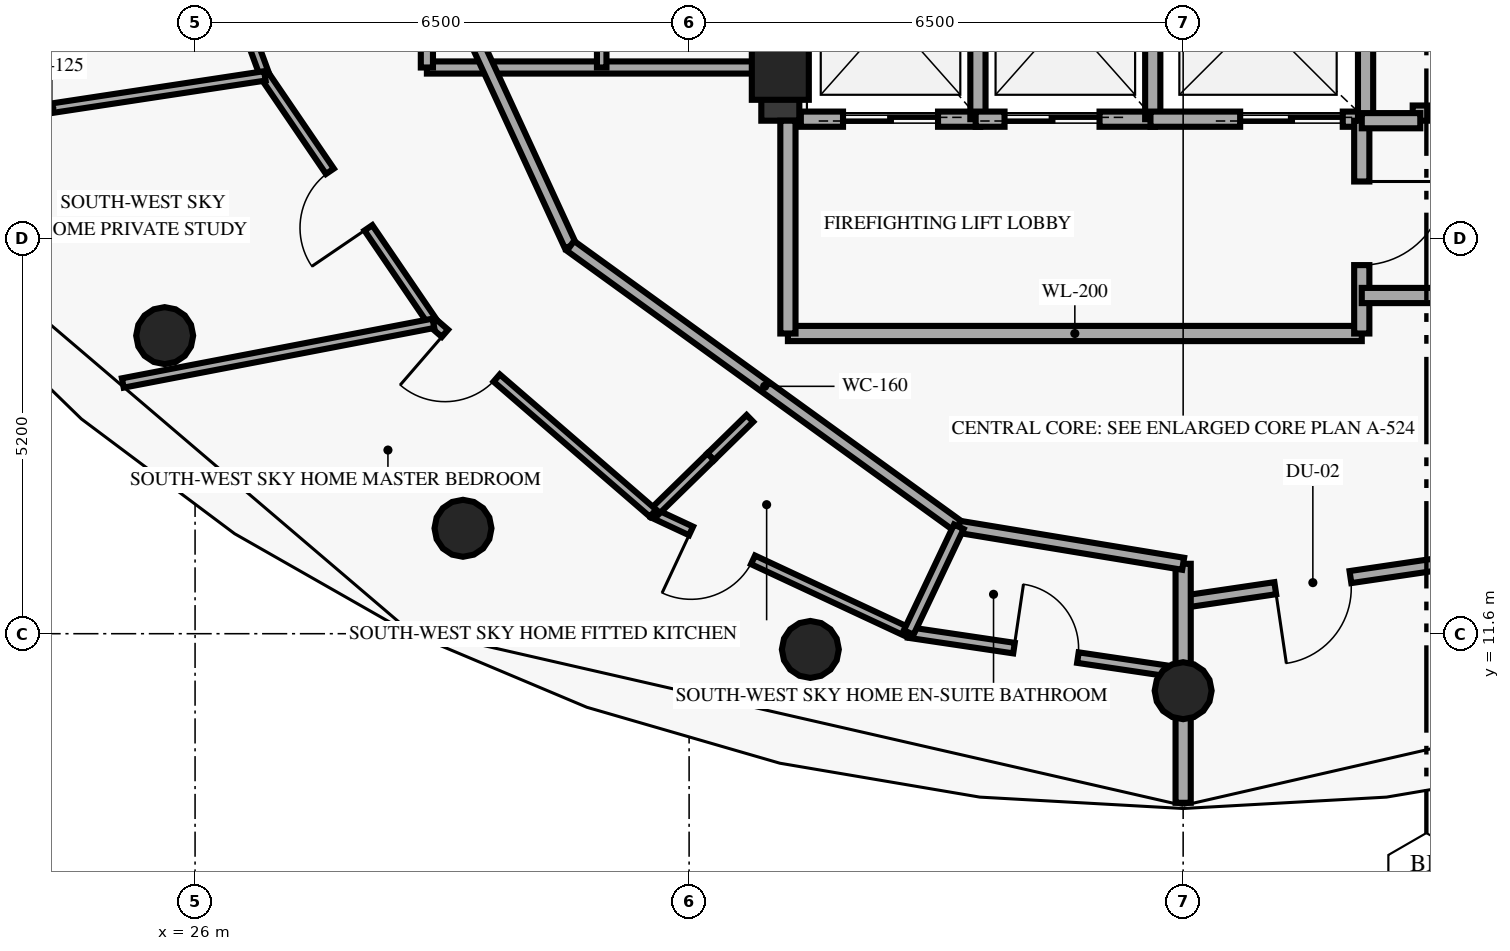
"""IFC4 building model, lengths in metres.
Left out: names, types, materials, properties, quantities, classifications, styles, units other than length and angle.
Written with IfcOpenShell. Run it as: python <this file> out.ifc"""

import sys

from ifc_helpers import new_model, si_unit, direction, frame, frame_2d, origin, origin_2d, place, context, subcontext, project, spatial, rectangle, circle, extrude, element, fill, save


model = new_model("IFC4")
c1 = context("Model", 3, precision=1e-05, world=origin(), true_north=direction((0.0, 1.0)))
c2 = subcontext(c1, "Body", "Model", "MODEL_VIEW")
j1 = project(units=[si_unit("LENGTHUNIT", "METRE"), si_unit("PLANEANGLEUNIT", "RADIAN")], contexts=[c1])
p1 = place(None, origin())
s1 = spatial("IfcSite", under=j1, at=p1, CompositionType="ELEMENT")
p2 = place(p1, origin())
s2 = spatial("IfcBuilding", under=s1, at=p2, CompositionType="ELEMENT")
p3 = place(p2, frame((0.0, 0.0, 297.4)))
s3 = spatial("IfcBuildingStorey", under=s2, at=p3, CompositionType="ELEMENT", Elevation=297.4)
p4 = place(p3, frame((33.7, 19.0, 0.0), z_axis=(0.0, 0.0, 1.0), x_axis=(1.0, 0.0, 0.0)))
e1 = element("IfcColumn", 1, at=p4, inside=s3, PredefinedType="PILASTER", context=c2, shape_type="SweptSolid", body=[
    extrude(rectangle(XDim=0.75, YDim=0.75, at=origin_2d()), origin(), (0.0, 0.0, 1.0), 3.45),
])
for number, where, z_axis, x_axis in (
    (2, (25.6, 15.522, 0.0), (0.0, 0.0, 1.0), (1.0, 0.0, 0.0)),
    (3, (29.525, 12.987, 0.0), (0.0, 0.0, 1.0), (1.0, 0.0, 0.0)),
    (4, (34.095, 11.393, 0.0), (0.0, 0.0, 1.0), (1.0, 0.0, 0.0)),
    (5, (39.0, 10.85, 0.0), (0.0, 0.0, 1.0), (1.0, 0.0, 0.0)),
):
    element("IfcColumn", number, at=place(p3, frame(where, z_axis=z_axis, x_axis=x_axis)), inside=s3, PredefinedType="COLUMN", context=c2, shape_type="SweptSolid", body=[
        extrude(circle(Radius=0.375, at=origin_2d()), origin(), (0.0, 0.0, 1.0), 3.45),
    ])
p5 = place(p3, frame((33.7, 18.35, 0.0), z_axis=(0.0, 0.0, 1.0), x_axis=(0.0, 1.0, 0.0)))
e6 = element("IfcWall", 6, at=p5, inside=s3, PredefinedType="SHEAR", context=c2, shape_type="SweptSolid", body=[
    extrude(rectangle(XDim=2.95, YDim=0.5, at=frame_2d((1.475, 0.0))), origin(), (0.0, 0.0, 1.0), 3.45),
])
p6 = place(p3, frame((33.97, 18.37, 0.0), z_axis=(0.0, 0.0, 1.0), x_axis=(1.0, 0.0, 0.0)))
e7 = element("IfcWall", 7, at=p6, inside=s3, PredefinedType="SOLIDWALL", context=c2, shape_type="SweptSolid", body=[
    extrude(rectangle(XDim=2.36, YDim=0.2, at=frame_2d((1.18, 0.0))), origin(), (0.0, 0.0, 1.0), 3.45),
])
p7 = place(p6, frame((0.555, 0.0, 0.0)))
e8 = element("IfcOpeningElement", 8, at=p7, cuts=e7, PredefinedType="OPENING", context=c2, shape_type="SweptSolid", body=[
    extrude(rectangle(XDim=1.25, YDim=2.2, at=frame_2d((0.625, 1.1))), frame((0.0, 0.11, 0.0), z_axis=(0.0, -1.0, 0.0), x_axis=(1.0, 0.0, 0.0)), (0.0, 0.0, 1.0), 0.22),
])
p8 = place(p3, frame((36.3, 18.37, 0.0), z_axis=(0.0, 0.0, 1.0), x_axis=(0.0, 1.0, 0.0)))
e9 = element("IfcWall", 9, at=p8, inside=s3, PredefinedType="SOLIDWALL", context=c2, shape_type="SweptSolid", body=[
    extrude(rectangle(XDim=2.71, YDim=0.2, at=frame_2d((1.355, 0.0))), origin(), (0.0, 0.0, 1.0), 3.45),
])
p9 = place(p3, frame((36.27, 18.37, 0.0), z_axis=(0.0, 0.0, 1.0), x_axis=(1.0, 0.0, 0.0)))
e10 = element("IfcWall", 10, at=p9, inside=s3, PredefinedType="SOLIDWALL", context=c2, shape_type="SweptSolid", body=[
    extrude(rectangle(XDim=2.36, YDim=0.2, at=frame_2d((1.18, 0.0))), origin(), (0.0, 0.0, 1.0), 3.45),
])
p10 = place(p9, frame((0.38, 0.0, 0.0)))
e11 = element("IfcOpeningElement", 11, at=p10, cuts=e10, PredefinedType="OPENING", context=c2, shape_type="SweptSolid", body=[
    extrude(rectangle(XDim=1.25, YDim=2.2, at=frame_2d((0.625, 1.1))), frame((0.0, 0.11, 0.0), z_axis=(0.0, -1.0, 0.0), x_axis=(1.0, 0.0, 0.0)), (0.0, 0.0, 1.0), 0.22),
])
p11 = place(p3, frame((38.6, 18.37, 0.0), z_axis=(0.0, 0.0, 1.0), x_axis=(0.0, 1.0, 0.0)))
e12 = element("IfcWall", 12, at=p11, inside=s3, PredefinedType="SOLIDWALL", context=c2, shape_type="SweptSolid", body=[
    extrude(rectangle(XDim=2.71, YDim=0.2, at=frame_2d((1.355, 0.0))), origin(), (0.0, 0.0, 1.0), 3.45),
])
p12 = place(p3, frame((38.57, 18.37, 0.0), z_axis=(0.0, 0.0, 1.0), x_axis=(1.0, 0.0, 0.0)))
e13 = element("IfcWall", 13, at=p12, inside=s3, PredefinedType="SOLIDWALL", context=c2, shape_type="SweptSolid", body=[
    extrude(rectangle(XDim=2.83, YDim=0.2, at=frame_2d((1.415, 0.0))), origin(), (0.0, 0.0, 1.0), 3.45),
])
p13 = place(p12, frame((1.18, 0.0, 0.0)))
e14 = element("IfcOpeningElement", 14, at=p13, cuts=e13, PredefinedType="OPENING", context=c2, shape_type="SweptSolid", body=[
    extrude(rectangle(XDim=1.35, YDim=2.18, at=frame_2d((0.675, 1.09))), frame((0.0, 0.11, 0.0), z_axis=(0.0, -1.0, 0.0), x_axis=(1.0, 0.0, 0.0)), (0.0, 0.0, 1.0), 0.22),
])
p14 = place(p3, frame((41.4, 18.37, 0.0), z_axis=(0.0, 0.0, 1.0), x_axis=(0.0, 1.0, 0.0)))
e15 = element("IfcWall", 15, at=p14, inside=s3, PredefinedType="SOLIDWALL", context=c2, shape_type="SweptSolid", body=[
    extrude(rectangle(XDim=2.71, YDim=0.2, at=frame_2d((1.355, 0.0))), origin(), (0.0, 0.0, 1.0), 3.45),
])
p15 = place(p3, frame((29.05, 19.05, 0.0), z_axis=(0.0, 0.0, 1.0), x_axis=(1.0, 0.0, 0.0)))
e16 = element("IfcWall", 16, at=p15, inside=s3, PredefinedType="PARTITIONING", context=c2, shape_type="SweptSolid", body=[
    extrude(rectangle(XDim=4.65, YDim=0.16, at=frame_2d((2.325, 0.0))), origin(), (0.0, 0.0, 1.0), 3.45),
])
p16 = place(p3, frame((29.05, 19.05, 0.0), z_axis=(0.0, 0.0, 1.0), x_axis=(0.0, 1.0, 0.0)))
e17 = element("IfcWall", 17, at=p16, inside=s3, PredefinedType="PARTITIONING", context=c2, shape_type="SweptSolid", body=[
    extrude(rectangle(XDim=7.07, YDim=0.16, at=frame_2d((3.535, 0.0))), origin(), (0.0, 0.0, 1.0), 3.45),
])
p17 = place(p3, frame((31.35, 19.05, 0.0), z_axis=(0.0, 0.0, 1.0), x_axis=(0.0, 1.0, 0.0)))
e18 = element("IfcWall", 18, at=p17, inside=s3, PredefinedType="PARTITIONING", context=c2, shape_type="SweptSolid", body=[
    extrude(rectangle(XDim=2.8, YDim=0.125, at=frame_2d((1.4, 0.0))), origin(), (0.0, 0.0, 1.0), 3.45),
])
p18 = place(p3, frame((33.8, 15.55, 0.0), z_axis=(0.0, 0.0, 1.0), x_axis=(1.0, 0.0, 0.0)))
e19 = element("IfcWall", 19, at=p18, inside=s3, PredefinedType="SOLIDWALL", context=c2, shape_type="SweptSolid", body=[
    extrude(rectangle(XDim=7.55, YDim=0.2, at=frame_2d((3.775, 0.0))), origin(), (0.0, 0.0, 1.0), 3.45),
])
p19 = place(p3, frame((33.8, 15.55, 0.0), z_axis=(0.0, 0.0, 1.0), x_axis=(0.0, 1.0, 0.0)))
e20 = element("IfcWall", 20, at=p19, inside=s3, PredefinedType="SOLIDWALL", context=c2, shape_type="SweptSolid", body=[
    extrude(rectangle(XDim=2.8, YDim=0.2, at=frame_2d((1.4, 0.0))), origin(), (0.0, 0.0, 1.0), 3.45),
])
p20 = place(p3, frame((41.35, 15.55, 0.0), z_axis=(0.0, 0.0, 1.0), x_axis=(0.0, 1.0, 0.0)))
e21 = element("IfcWall", 21, at=p20, inside=s3, PredefinedType="SOLIDWALL", context=c2, shape_type="SweptSolid", body=[
    extrude(rectangle(XDim=2.8, YDim=0.2, at=frame_2d((1.4, 0.0))), origin(), (0.0, 0.0, 1.0), 3.45),
])
p21 = place(p20, frame((0.9, 0.0, 0.0)))
e22 = element("IfcOpeningElement", 22, at=p21, cuts=e21, PredefinedType="OPENING", context=c2, shape_type="SweptSolid", body=[
    extrude(rectangle(XDim=1.1, YDim=2.15, at=frame_2d((0.55, 1.075))), frame((0.0, 0.11, 0.0), z_axis=(0.0, -1.0, 0.0), x_axis=(1.0, 0.0, 0.0)), (0.0, 0.0, 1.0), 0.22),
])
p22 = place(p3, frame((41.35, 16.05, 0.0), z_axis=(0.0, 0.0, 1.0), x_axis=(1.0, 0.0, 0.0)))
e23 = element("IfcWall", 23, at=p22, inside=s3, PredefinedType="SOLIDWALL", context=c2, shape_type="SweptSolid", body=[
    extrude(rectangle(XDim=4.5, YDim=0.2, at=frame_2d((2.25, 0.0))), origin(), (0.0, 0.0, 1.0), 3.45),
])
p23 = place(p3, frame((42.12, 18.35, 0.0), z_axis=(0.0, 0.0, 1.0), x_axis=(0.0, 1.0, 0.0)))
e24 = element("IfcWall", 24, at=p23, inside=s3, PredefinedType="SOLIDWALL", context=c2, shape_type="SweptSolid", body=[
    extrude(rectangle(XDim=2.95, YDim=0.2, at=frame_2d((1.475, 0.0))), origin(), (0.0, 0.0, 1.0), 3.45),
])
p24 = place(p23, frame((0.2, 0.0, 0.0)))
e25 = element("IfcOpeningElement", 25, at=p24, cuts=e24, PredefinedType="OPENING", context=c2, shape_type="SweptSolid", body=[
    extrude(rectangle(XDim=0.8, YDim=2.05, at=frame_2d((0.4, 1.025))), frame((0.0, 0.11, 0.0), z_axis=(0.0, -1.0, 0.0), x_axis=(1.0, 0.0, 0.0)), (0.0, 0.0, 1.0), 0.22),
])
p25 = place(p3, frame((41.35, 18.35, 0.0), z_axis=(0.0, 0.0, 1.0), x_axis=(1.0, 0.0, 0.0)))
e26 = element("IfcWall", 26, at=p25, inside=s3, PredefinedType="SOLIDWALL", context=c2, shape_type="SweptSolid", body=[
    extrude(rectangle(XDim=0.77, YDim=0.2, at=frame_2d((0.385, 0.0))), origin(), (0.0, 0.0, 1.0), 3.45),
])
p26 = place(p3, frame((42.414, 12.524, 0.0), z_axis=(0.0, 0.0, 1.0), x_axis=(-0.989282323844, -0.146015354435, 0.0)))
e27 = element("IfcWall", 27, at=p26, inside=s3, PredefinedType="PARTITIONING", context=c2, shape_type="SweptSolid", body=[
    extrude(rectangle(XDim=3.451, YDim=0.16, at=frame_2d((1.726, 0.0))), origin(), (0.0, 0.0, 1.0), 3.45),
])
p27 = place(p26, frame((1.226, 0.0, 0.0)))
e28 = element("IfcOpeningElement", 28, at=p27, cuts=e27, PredefinedType="OPENING", context=c2, shape_type="SweptSolid", body=[
    extrude(rectangle(XDim=1.0, YDim=2.15, at=frame_2d((0.5, 1.075))), frame((0.0, 0.09, 0.0), z_axis=(0.0, -1.0, 0.0), x_axis=(1.0, 0.0, 0.0)), (0.0, 0.0, 1.0), 0.18),
])
p28 = place(p3, frame((39.0, 12.52, 0.0), z_axis=(0.0, 0.0, 1.0), x_axis=(0.0, -1.0, 0.0)))
e29 = element("IfcWall", 29, at=p28, inside=s3, PredefinedType="PARTITIONING", context=c2, shape_type="SweptSolid", body=[
    extrude(rectangle(XDim=1.69, YDim=0.2, at=frame_2d((0.845, 0.0))), origin(), (0.0, 0.0, 1.0), 2.835),
])
p29 = place(p3, frame((39.0, 10.83, 0.0), z_axis=(0.0, 0.0, 1.0), x_axis=(0.0, -1.0, 0.0)))
e30 = element("IfcWall", 30, at=p29, inside=s3, PredefinedType="PARTITIONING", context=c2, shape_type="SweptSolid", body=[
    extrude(rectangle(XDim=1.455, YDim=0.2, at=frame_2d((0.728, 0.0))), origin(), (0.0, 0.0, 1.0), 3.45),
])
p30 = place(p3, frame((27.988, 23.104, 0.0), z_axis=(0.0, 0.0, 1.0), x_axis=(0.418656179426, -0.908144814128, 0.0)))
e31 = element("IfcWall", 31, at=p30, inside=s3, PredefinedType="PARTITIONING", context=c2, shape_type="SweptSolid", body=[
    extrude(rectangle(XDim=7.049, YDim=0.16, at=frame_2d((3.524, 0.0))), origin(), (0.0, 0.0, 1.0), 3.45),
])
p31 = place(p3, frame((30.939, 16.703, 0.0), z_axis=(0.0, 0.0, 1.0), x_axis=(0.810290119061, -0.586028943784, 0.0)))
e32 = element("IfcWall", 32, at=p31, inside=s3, PredefinedType="PARTITIONING", context=c2, shape_type="SweptSolid", body=[
    extrude(rectangle(XDim=6.306, YDim=0.16, at=frame_2d((3.153, 0.0))), origin(), (0.0, 0.0, 1.0), 3.45),
])
p32 = place(p3, frame((36.049, 13.007, 0.0), z_axis=(0.0, 0.0, 1.0), x_axis=(0.986650832406, -0.162850038111, 0.0)))
e33 = element("IfcWall", 33, at=p32, inside=s3, PredefinedType="PARTITIONING", context=c2, shape_type="SweptSolid", body=[
    extrude(rectangle(XDim=2.991, YDim=0.16, at=frame_2d((1.496, 0.0))), origin(), (0.0, 0.0, 1.0), 3.45),
])
p33 = place(p3, frame((35.389, 11.616, 0.0), z_axis=(0.0, 0.0, 1.0), x_axis=(-0.906162977721, 0.422928667517, 0.0)))
e34 = element("IfcWall", 34, at=p33, inside=s3, PredefinedType="PARTITIONING", context=c2, shape_type="SweptSolid", body=[
    extrude(rectangle(XDim=3.712, YDim=0.125, at=frame_2d((1.856, 0.0))), origin(), (0.0, 0.0, 1.0), 3.45),
])
p34 = place(p33, frame((2.26, 0.0, 0.0)))
e35 = element("IfcOpeningElement", 35, at=p34, cuts=e34, PredefinedType="OPENING", context=c2, shape_type="SweptSolid", body=[
    extrude(rectangle(XDim=0.9, YDim=2.1, at=frame_2d((0.45, 1.05))), frame((0.0, 0.073, 0.0), z_axis=(0.0, -1.0, 0.0), x_axis=(1.0, 0.0, 0.0)), (0.0, 0.0, 1.0), 0.145),
])
p35 = place(p3, frame((39.0, 11.08, 0.0), z_axis=(0.0, 0.0, 1.0), x_axis=(-0.989167166266, 0.146793450744, 0.0)))
e36 = element("IfcWall", 36, at=p35, inside=s3, PredefinedType="PARTITIONING", context=c2, shape_type="SweptSolid", body=[
    extrude(rectangle(XDim=3.651, YDim=0.14, at=frame_2d((1.825, 0.0))), origin(), (0.0, 0.0, 1.0), 3.45),
])
p36 = place(p35, frame((1.4, 0.0, 0.0)))
e37 = element("IfcOpeningElement", 37, at=p36, cuts=e36, PredefinedType="OPENING", context=c2, shape_type="SweptSolid", body=[
    extrude(rectangle(XDim=0.85, YDim=2.1, at=frame_2d((0.425, 1.05))), frame((0.0, 0.08, 0.0), z_axis=(0.0, -1.0, 0.0), x_axis=(1.0, 0.0, 0.0)), (0.0, 0.0, 1.0), 0.16),
])
p37 = place(p3, frame((33.3, 14.433, 0.0), z_axis=(0.0, 0.0, 1.0), x_axis=(-0.714672361604, -0.699459373774, 0.0)))
e38 = element("IfcWall", 38, at=p37, inside=s3, PredefinedType="PARTITIONING", context=c2, shape_type="SweptSolid", body=[
    extrude(rectangle(XDim=0.722, YDim=0.125, at=frame_2d((0.361, 0.0))), origin(), (0.0, 0.0, 1.0), 3.095),
])
p38 = place(p3, frame((32.784, 13.928, 0.0), z_axis=(0.0, 0.0, 1.0), x_axis=(-0.715111418379, -0.699010485833, 0.0)))
e39 = element("IfcWall", 39, at=p38, inside=s3, PredefinedType="PARTITIONING", context=c2, shape_type="SweptSolid", body=[
    extrude(rectangle(XDim=1.062, YDim=0.125, at=frame_2d((0.531, 0.0))), origin(), (0.0, 0.0, 1.0), 3.45),
])
p39 = place(p3, frame((36.049, 13.007, 0.0), z_axis=(0.0, 0.0, 1.0), x_axis=(-0.428726905473, -0.903434137347, 0.0)))
e40 = element("IfcWall", 40, at=p39, inside=s3, PredefinedType="PARTITIONING", context=c2, shape_type="SweptSolid", body=[
    extrude(rectangle(XDim=1.54, YDim=0.14, at=frame_2d((0.77, 0.0))), origin(), (0.0, 0.0, 1.0), 3.45),
])
p40 = place(p3, frame((26.919, 18.94, 0.0), z_axis=(0.0, 0.0, 1.0), x_axis=(-0.345128286029, 0.938555521097, 0.0)))
e41 = element("IfcWall", 41, at=p40, inside=s3, PredefinedType="PARTITIONING", context=c2, shape_type="SweptSolid", body=[
    extrude(rectangle(XDim=4.039, YDim=0.125, at=frame_2d((2.02, 0.0))), origin(), (0.0, 0.0, 1.0), 3.45),
])
p41 = place(p40, frame((1.57, 0.0, 0.0)))
e42 = element("IfcOpeningElement", 42, at=p41, cuts=e41, PredefinedType="OPENING", context=c2, shape_type="SweptSolid", body=[
    extrude(rectangle(XDim=0.9, YDim=2.1, at=frame_2d((0.45, 1.05))), frame((0.0, 0.073, 0.0), z_axis=(0.0, -1.0, 0.0), x_axis=(1.0, 0.0, 0.0)), (0.0, 0.0, 1.0), 0.145),
])
p42 = place(p3, frame((29.136, 15.684, 0.0), z_axis=(0.0, 0.0, 1.0), x_axis=(-0.562840533245, 0.826565505049, 0.0)))
e43 = element("IfcWall", 43, at=p42, inside=s3, PredefinedType="PARTITIONING", context=c2, shape_type="SweptSolid", body=[
    extrude(rectangle(XDim=3.939, YDim=0.125, at=frame_2d((1.969, 0.0))), origin(), (0.0, 0.0, 1.0), 3.45),
])
p43 = place(p42, frame((1.52, 0.0, 0.0)))
e44 = element("IfcOpeningElement", 44, at=p43, cuts=e43, PredefinedType="OPENING", context=c2, shape_type="SweptSolid", body=[
    extrude(rectangle(XDim=0.9, YDim=2.1, at=frame_2d((0.45, 1.05))), frame((0.0, 0.073, 0.0), z_axis=(0.0, -1.0, 0.0), x_axis=(1.0, 0.0, 0.0)), (0.0, 0.0, 1.0), 0.145),
])
p44 = place(p3, frame((32.025, 13.186, 0.0), z_axis=(0.0, 0.0, 1.0), x_axis=(-0.756424716633, 0.654080765706, 0.0)))
e45 = element("IfcWall", 45, at=p44, inside=s3, PredefinedType="PARTITIONING", context=c2, shape_type="SweptSolid", body=[
    extrude(rectangle(XDim=3.819, YDim=0.125, at=frame_2d((1.91, 0.0))), origin(), (0.0, 0.0, 1.0), 3.45),
])
p45 = place(p44, frame((2.719, 0.0, 0.0)))
e46 = element("IfcOpeningElement", 46, at=p45, cuts=e45, PredefinedType="OPENING", context=c2, shape_type="SweptSolid", body=[
    extrude(rectangle(XDim=0.9, YDim=2.1, at=frame_2d((0.45, 1.05))), frame((0.0, 0.073, 0.0), z_axis=(0.0, -1.0, 0.0), x_axis=(1.0, 0.0, 0.0)), (0.0, 0.0, 1.0), 0.145),
])
p46 = place(p3, frame((26.919, 18.94, 0.0), z_axis=(0.0, 0.0, 1.0), x_axis=(-0.988653601615, -0.150213368291, 0.0)))
e47 = element("IfcWall", 47, at=p46, inside=s3, PredefinedType="PARTITIONING", context=c2, shape_type="SweptSolid", body=[
    extrude(rectangle(XDim=5.672, YDim=0.125, at=frame_2d((2.836, 0.0))), origin(), (0.0, 0.0, 1.0), 3.45),
])
p47 = place(p3, frame((29.136, 15.684, 0.0), z_axis=(0.0, 0.0, 1.0), x_axis=(-0.982041578383, -0.188664618643, 0.0)))
e48 = element("IfcWall", 48, at=p47, inside=s3, PredefinedType="PARTITIONING", context=c2, shape_type="SweptSolid", body=[
    extrude(rectangle(XDim=4.162, YDim=0.125, at=frame_2d((2.081, 0.0))), origin(), (0.0, 0.0, 1.0), 3.45),
])
p48 = place(p7, origin())
e49 = element("IfcDoor", 49, at=p48, inside=s3, OperationType="DOUBLE_DOOR_SLIDING", PredefinedType="DOOR", context=c2, shape_type="SweptSolid", body=[
    extrude(rectangle(XDim=1.25, YDim=2.2, at=frame_2d((0.625, 1.1))), frame((0.0, 0.025, 0.0), z_axis=(0.0, -1.0, 0.0), x_axis=(1.0, 0.0, 0.0)), (0.0, 0.0, 1.0), 0.05),
])
fill(e8, e49)
p49 = place(p10, origin())
e50 = element("IfcDoor", 50, at=p49, inside=s3, OperationType="DOUBLE_DOOR_SLIDING", PredefinedType="DOOR", context=c2, shape_type="SweptSolid", body=[
    extrude(rectangle(XDim=1.25, YDim=2.2, at=frame_2d((0.625, 1.1))), frame((0.0, 0.025, 0.0), z_axis=(0.0, -1.0, 0.0), x_axis=(1.0, 0.0, 0.0)), (0.0, 0.0, 1.0), 0.05),
])
fill(e11, e50)
p50 = place(p13, origin())
e51 = element("IfcDoor", 51, at=p50, inside=s3, OperationType="DOUBLE_DOOR_SLIDING", PredefinedType="DOOR", context=c2, shape_type="SweptSolid", body=[
    extrude(rectangle(XDim=1.35, YDim=2.18, at=frame_2d((0.675, 1.09))), frame((0.0, 0.025, 0.0), z_axis=(0.0, -1.0, 0.0), x_axis=(1.0, 0.0, 0.0)), (0.0, 0.0, 1.0), 0.05),
])
fill(e14, e51)
p51 = place(p21, origin())
e52 = element("IfcDoor", 52, at=p51, inside=s3, OperationType="SINGLE_SWING_RIGHT", PredefinedType="DOOR", context=c2, shape_type="SweptSolid", body=[
    extrude(rectangle(XDim=1.1, YDim=2.15, at=frame_2d((0.55, 1.075))), frame((0.0, 0.025, 0.0), z_axis=(0.0, -1.0, 0.0), x_axis=(1.0, 0.0, 0.0)), (0.0, 0.0, 1.0), 0.05),
])
fill(e22, e52)
p52 = place(p24, origin())
e53 = element("IfcDoor", 53, at=p52, inside=s3, OperationType="SINGLE_SWING_LEFT", PredefinedType="DOOR", context=c2, shape_type="SweptSolid", body=[
    extrude(rectangle(XDim=0.8, YDim=2.05, at=frame_2d((0.4, 1.025))), frame((0.0, 0.025, 0.0), z_axis=(0.0, -1.0, 0.0), x_axis=(1.0, 0.0, 0.0)), (0.0, 0.0, 1.0), 0.05),
])
fill(e25, e53)
p53 = place(p27, origin())
e54 = element("IfcDoor", 54, at=p53, inside=s3, OperationType="SINGLE_SWING_RIGHT", PredefinedType="DOOR", context=c2, shape_type="SweptSolid", body=[
    extrude(rectangle(XDim=1.0, YDim=2.15, at=frame_2d((0.5, 1.075))), frame((0.0, 0.025, 0.0), z_axis=(0.0, -1.0, 0.0), x_axis=(1.0, 0.0, 0.0)), (0.0, 0.0, 1.0), 0.05),
])
fill(e28, e54)
p54 = place(p34, origin())
e55 = element("IfcDoor", 55, at=p54, inside=s3, OperationType="SINGLE_SWING_RIGHT", PredefinedType="DOOR", context=c2, shape_type="SweptSolid", body=[
    extrude(rectangle(XDim=0.9, YDim=2.1, at=frame_2d((0.45, 1.05))), frame((0.0, 0.025, 0.0), z_axis=(0.0, -1.0, 0.0), x_axis=(1.0, 0.0, 0.0)), (0.0, 0.0, 1.0), 0.05),
])
fill(e35, e55)
p55 = place(p36, origin())
e56 = element("IfcDoor", 56, at=p55, inside=s3, OperationType="SINGLE_SWING_RIGHT", PredefinedType="DOOR", context=c2, shape_type="SweptSolid", body=[
    extrude(rectangle(XDim=0.85, YDim=2.1, at=frame_2d((0.425, 1.05))), frame((0.0, 0.025, 0.0), z_axis=(0.0, -1.0, 0.0), x_axis=(1.0, 0.0, 0.0)), (0.0, 0.0, 1.0), 0.05),
])
fill(e37, e56)
p56 = place(p43, origin())
e57 = element("IfcDoor", 57, at=p56, inside=s3, OperationType="SINGLE_SWING_LEFT", PredefinedType="DOOR", context=c2, shape_type="SweptSolid", body=[
    extrude(rectangle(XDim=0.9, YDim=2.1, at=frame_2d((0.45, 1.05))), frame((0.0, 0.025, 0.0), z_axis=(0.0, -1.0, 0.0), x_axis=(1.0, 0.0, 0.0)), (0.0, 0.0, 1.0), 0.05),
])
fill(e44, e57)
p57 = place(p45, origin())
e58 = element("IfcDoor", 58, at=p57, inside=s3, OperationType="SINGLE_SWING_RIGHT", PredefinedType="DOOR", context=c2, shape_type="SweptSolid", body=[
    extrude(rectangle(XDim=0.9, YDim=2.1, at=frame_2d((0.45, 1.05))), frame((0.0, 0.025, 0.0), z_axis=(0.0, -1.0, 0.0), x_axis=(1.0, 0.0, 0.0)), (0.0, 0.0, 1.0), 0.05),
])
fill(e46, e58)
save(model, sys.argv[1])
